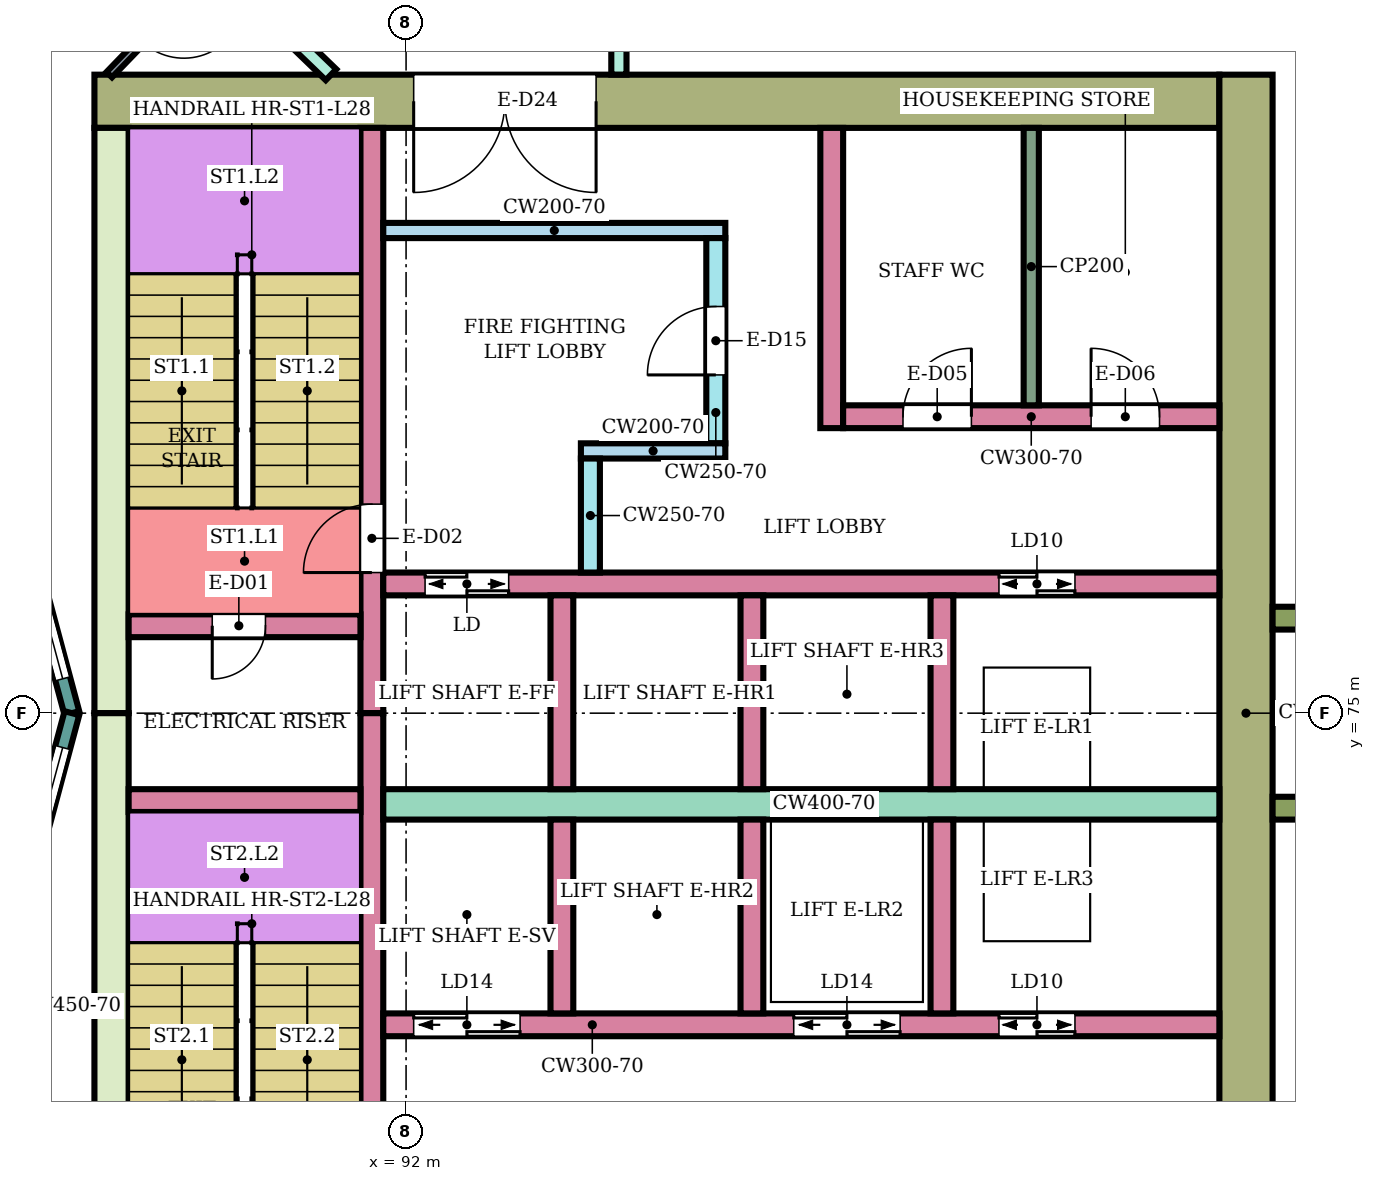
"""IFC4 building model, lengths in metres.
Left out: names, types, materials, properties, quantities, classifications, styles, units other than length and angle.
Written with IfcOpenShell. Run it as: python <this file> out.ifc"""

import sys

from ifc_helpers import new_model, si_unit, direction, frame, frame_2d, origin, place, context, subcontext, project, spatial, rectangle, extrude, element, fill, save


model = new_model("IFC4")
c1 = context("Model", 3, precision=1e-05, world=origin(), true_north=direction((0.0, 1.0)))
c2 = subcontext(c1, "Body", "Model", "MODEL_VIEW")
j1 = project(units=[si_unit("LENGTHUNIT", "METRE"), si_unit("PLANEANGLEUNIT", "RADIAN")], contexts=[c1])
p1 = place(None, origin())
s1 = spatial("IfcSite", under=j1, at=p1, CompositionType="ELEMENT")
p2 = place(p1, origin())
s2 = spatial("IfcBuilding", under=s1, at=p2, CompositionType="ELEMENT")
p3 = place(p2, frame((0.0, 0.0, 122.4)))
s3 = spatial("IfcBuildingStorey", under=s2, at=p3, CompositionType="ELEMENT", Elevation=122.4)
p4 = place(p3, frame((87.9, 83.05, 0.0), z_axis=(0.0, 0.0, 1.0), x_axis=(1.0, 0.0, 0.0)))
e1 = element("IfcWall", 1, at=p4, inside=s3, PredefinedType="SHEAR", context=c2, shape_type="SweptSolid", body=[
    extrude(rectangle(XDim=14.8, YDim=0.7, at=frame_2d((7.4, 0.0))), origin(), (0.0, 0.0, 1.0), 3.58),
])
p5 = place(p4, frame((4.2, 0.0, 0.0)))
e2 = element("IfcOpeningElement", 2, at=p5, cuts=e1, PredefinedType="OPENING", context=c2, shape_type="SweptSolid", body=[
    extrude(rectangle(XDim=2.4, YDim=2.4, at=frame_2d((1.2, 1.2))), frame((0.0, 0.36, 0.0), z_axis=(0.0, -1.0, 0.0), x_axis=(1.0, 0.0, 0.0)), (0.0, 0.0, 1.0), 0.72),
])
for number, where, z_axis, x_axis in (
    (3, (88.125, 75.0, 0.0), (0.0, 0.0, 1.0), (0.0, 1.0, 0.0)),
    (4, (88.125, 67.3, 0.0), (0.0, 0.0, 1.0), (0.0, 1.0, 0.0)),
):
    element("IfcWall", number, at=place(p3, frame(where, z_axis=z_axis, x_axis=x_axis)), inside=s3, PredefinedType="SHEAR", context=c2, shape_type="SweptSolid", body=[
        extrude(rectangle(XDim=7.7, YDim=0.45, at=frame_2d((3.85, 0.0))), origin(), (0.0, 0.0, 1.0), 3.58),
    ])
p6 = place(p3, frame((103.05, 66.6, 0.0), z_axis=(0.0, 0.0, 1.0), x_axis=(0.0, 1.0, 0.0)))
e5 = element("IfcWall", 5, at=p6, inside=s3, PredefinedType="SHEAR", context=c2, shape_type="SweptSolid", body=[
    extrude(rectangle(XDim=16.8, YDim=0.7, at=frame_2d((8.4, 0.0))), origin(), (0.0, 0.0, 1.0), 3.58),
])
p7 = place(p3, frame((91.55, 75.0, 0.0), z_axis=(0.0, 0.0, 1.0), x_axis=(0.0, 1.0, 0.0)))
e6 = element("IfcWall", 6, at=p7, inside=s3, PredefinedType="SHEAR", context=c2, shape_type="SweptSolid", body=[
    extrude(rectangle(XDim=7.7, YDim=0.3, at=frame_2d((3.85, 0.0))), origin(), (0.0, 0.0, 1.0), 3.58),
])
p8 = place(p7, frame((1.85, 0.0, 0.0)))
e7 = element("IfcOpeningElement", 7, at=p8, cuts=e6, PredefinedType="OPENING", context=c2, shape_type="SweptSolid", body=[
    extrude(rectangle(XDim=0.9, YDim=2.1, at=frame_2d((0.45, 1.05))), frame((0.0, 0.16, 0.0), z_axis=(0.0, -1.0, 0.0), x_axis=(1.0, 0.0, 0.0)), (0.0, 0.0, 1.0), 0.32),
])
p9 = place(p3, frame((91.55, 67.3, 0.0), z_axis=(0.0, 0.0, 1.0), x_axis=(0.0, 1.0, 0.0)))
e8 = element("IfcWall", 8, at=p9, inside=s3, PredefinedType="SHEAR", context=c2, shape_type="SweptSolid", body=[
    extrude(rectangle(XDim=7.7, YDim=0.3, at=frame_2d((3.85, 0.0))), origin(), (0.0, 0.0, 1.0), 3.58),
])
p10 = place(p9, frame((0.35, 0.0, 0.0)))
e9 = element("IfcOpeningElement", 9, at=p10, cuts=e8, PredefinedType="OPENING", context=c2, shape_type="SweptSolid", body=[
    extrude(rectangle(XDim=0.9, YDim=2.1, at=frame_2d((0.45, 1.05))), frame((0.0, 0.16, 0.0), z_axis=(0.0, -1.0, 0.0), x_axis=(1.0, 0.0, 0.0)), (0.0, 0.0, 1.0), 0.32),
])
p11 = place(p3, frame((88.35, 76.15, 0.0), z_axis=(0.0, 0.0, 1.0), x_axis=(1.0, 0.0, 0.0)))
e10 = element("IfcWall", 10, at=p11, inside=s3, PredefinedType="SHEAR", context=c2, shape_type="SweptSolid", body=[
    extrude(rectangle(XDim=3.05, YDim=0.3, at=frame_2d((1.525, 0.0))), origin(), (0.0, 0.0, 1.0), 3.58),
])
p12 = place(p11, frame((1.1, 0.0, 0.0)))
e11 = element("IfcOpeningElement", 11, at=p12, cuts=e10, PredefinedType="OPENING", context=c2, shape_type="SweptSolid", body=[
    extrude(rectangle(XDim=0.7, YDim=2.0, at=frame_2d((0.35, 1.0))), frame((0.0, 0.16, 0.0), z_axis=(0.0, -1.0, 0.0), x_axis=(1.0, 0.0, 0.0)), (0.0, 0.0, 1.0), 0.32),
])
p13 = place(p3, frame((88.35, 73.85, 0.0), z_axis=(0.0, 0.0, 1.0), x_axis=(1.0, 0.0, 0.0)))
e12 = element("IfcWall", 12, at=p13, inside=s3, PredefinedType="SHEAR", context=c2, shape_type="SweptSolid", body=[
    extrude(rectangle(XDim=3.05, YDim=0.3, at=frame_2d((1.525, 0.0))), origin(), (0.0, 0.0, 1.0), 3.58),
])
p14 = place(p3, frame((91.7, 76.7, 0.0), z_axis=(0.0, 0.0, 1.0), x_axis=(1.0, 0.0, 0.0)))
e13 = element("IfcWall", 13, at=p14, inside=s3, PredefinedType="SHEAR", context=c2, shape_type="SweptSolid", body=[
    extrude(rectangle(XDim=11.0, YDim=0.3, at=frame_2d((5.5, 0.0))), origin(), (0.0, 0.0, 1.0), 3.58),
])
p15 = place(p14, frame((0.55, 0.0, 0.0)))
e14 = element("IfcOpeningElement", 14, at=p15, cuts=e13, PredefinedType="OPENING", context=c2, shape_type="SweptSolid", body=[
    extrude(rectangle(XDim=1.1, YDim=2.1, at=frame_2d((0.55, 1.05))), frame((0.0, 0.16, 0.0), z_axis=(0.0, -1.0, 0.0), x_axis=(1.0, 0.0, 0.0)), (0.0, 0.0, 1.0), 0.32),
])
p16 = place(p14, frame((8.1, 0.0, 0.0)))
e15 = element("IfcOpeningElement", 15, at=p16, cuts=e13, PredefinedType="OPENING", context=c2, shape_type="SweptSolid", body=[
    extrude(rectangle(XDim=1.0, YDim=2.1, at=frame_2d((0.5, 1.05))), frame((0.0, 0.16, 0.0), z_axis=(0.0, -1.0, 0.0), x_axis=(1.0, 0.0, 0.0)), (0.0, 0.0, 1.0), 0.32),
])
p17 = place(p3, frame((91.7, 73.8, 0.0), z_axis=(0.0, 0.0, 1.0), x_axis=(1.0, 0.0, 0.0)))
e16 = element("IfcWall", 16, at=p17, inside=s3, PredefinedType="SHEAR", context=c2, shape_type="SweptSolid", body=[
    extrude(rectangle(XDim=11.0, YDim=0.4, at=frame_2d((5.5, 0.0))), origin(), (0.0, 0.0, 1.0), 3.58),
])
p18 = place(p3, frame((91.7, 70.9, 0.0), z_axis=(0.0, 0.0, 1.0), x_axis=(1.0, 0.0, 0.0)))
e17 = element("IfcWall", 17, at=p18, inside=s3, PredefinedType="SHEAR", context=c2, shape_type="SweptSolid", body=[
    extrude(rectangle(XDim=11.0, YDim=0.3, at=frame_2d((5.5, 0.0))), origin(), (0.0, 0.0, 1.0), 3.58),
])
p19 = place(p18, frame((0.4, 0.0, 0.0)))
e18 = element("IfcOpeningElement", 18, at=p19, cuts=e17, PredefinedType="OPENING", context=c2, shape_type="SweptSolid", body=[
    extrude(rectangle(XDim=1.4, YDim=2.1, at=frame_2d((0.7, 1.05))), frame((0.0, 0.16, 0.0), z_axis=(0.0, -1.0, 0.0), x_axis=(1.0, 0.0, 0.0)), (0.0, 0.0, 1.0), 0.32),
])
p20 = place(p18, frame((5.4, 0.0, 0.0)))
e19 = element("IfcOpeningElement", 19, at=p20, cuts=e17, PredefinedType="OPENING", context=c2, shape_type="SweptSolid", body=[
    extrude(rectangle(XDim=1.4, YDim=2.1, at=frame_2d((0.7, 1.05))), frame((0.0, 0.16, 0.0), z_axis=(0.0, -1.0, 0.0), x_axis=(1.0, 0.0, 0.0)), (0.0, 0.0, 1.0), 0.32),
])
p21 = place(p18, frame((8.1, 0.0, 0.0)))
e20 = element("IfcOpeningElement", 20, at=p21, cuts=e17, PredefinedType="OPENING", context=c2, shape_type="SweptSolid", body=[
    extrude(rectangle(XDim=1.0, YDim=2.1, at=frame_2d((0.5, 1.05))), frame((0.0, 0.16, 0.0), z_axis=(0.0, -1.0, 0.0), x_axis=(1.0, 0.0, 0.0)), (0.0, 0.0, 1.0), 0.32),
])
for number, where, z_axis, x_axis in (
    (21, (94.05, 74.0, 0.0), (0.0, 0.0, 1.0), (0.0, 1.0, 0.0)),
    (22, (96.55, 74.0, 0.0), (0.0, 0.0, 1.0), (0.0, 1.0, 0.0)),
    (23, (99.05, 74.0, 0.0), (0.0, 0.0, 1.0), (0.0, 1.0, 0.0)),
    (24, (94.05, 71.05, 0.0), (0.0, 0.0, 1.0), (0.0, 1.0, 0.0)),
    (25, (96.55, 71.05, 0.0), (0.0, 0.0, 1.0), (0.0, 1.0, 0.0)),
    (26, (99.05, 71.05, 0.0), (0.0, 0.0, 1.0), (0.0, 1.0, 0.0)),
):
    element("IfcWall", number, at=place(p3, frame(where, z_axis=z_axis, x_axis=x_axis)), inside=s3, PredefinedType="SHEAR", context=c2, shape_type="SweptSolid", body=[
        extrude(rectangle(XDim=2.55, YDim=0.3, at=frame_2d((1.275, 0.0))), origin(), (0.0, 0.0, 1.0), 3.58),
    ])
p22 = place(p3, frame((91.7, 81.35, 0.0), z_axis=(0.0, 0.0, 1.0), x_axis=(1.0, 0.0, 0.0)))
e27 = element("IfcWall", 27, at=p22, inside=s3, PredefinedType="SHEAR", context=c2, shape_type="SweptSolid", body=[
    extrude(rectangle(XDim=4.5, YDim=0.2, at=frame_2d((2.25, 0.0))), origin(), (0.0, 0.0, 1.0), 3.58),
])
p23 = place(p3, frame((96.075, 78.55, 0.0), z_axis=(0.0, 0.0, 1.0), x_axis=(0.0, 1.0, 0.0)))
e28 = element("IfcWall", 28, at=p23, inside=s3, PredefinedType="SHEAR", context=c2, shape_type="SweptSolid", body=[
    extrude(rectangle(XDim=2.7, YDim=0.25, at=frame_2d((1.35, 0.0))), origin(), (0.0, 0.0, 1.0), 3.58),
])
p24 = place(p23, frame((0.9, 0.0, 0.0)))
e29 = element("IfcOpeningElement", 29, at=p24, cuts=e28, PredefinedType="OPENING", context=c2, shape_type="SweptSolid", body=[
    extrude(rectangle(XDim=0.9, YDim=2.1, at=frame_2d((0.45, 1.05))), frame((0.0, 0.135, 0.0), z_axis=(0.0, -1.0, 0.0), x_axis=(1.0, 0.0, 0.0)), (0.0, 0.0, 1.0), 0.27),
])
p25 = place(p3, frame((94.3, 78.45, 0.0), z_axis=(0.0, 0.0, 1.0), x_axis=(1.0, 0.0, 0.0)))
e30 = element("IfcWall", 30, at=p25, inside=s3, PredefinedType="SHEAR", context=c2, shape_type="SweptSolid", body=[
    extrude(rectangle(XDim=1.9, YDim=0.2, at=frame_2d((0.95, 0.0))), origin(), (0.0, 0.0, 1.0), 3.58),
])
p26 = place(p3, frame((94.425, 76.85, 0.0), z_axis=(0.0, 0.0, 1.0), x_axis=(0.0, 1.0, 0.0)))
e31 = element("IfcWall", 31, at=p26, inside=s3, PredefinedType="SHEAR", context=c2, shape_type="SweptSolid", body=[
    extrude(rectangle(XDim=1.5, YDim=0.25, at=frame_2d((0.75, 0.0))), origin(), (0.0, 0.0, 1.0), 3.58),
])
p27 = place(p3, frame((97.6, 78.75, 0.0), z_axis=(0.0, 0.0, 1.0), x_axis=(0.0, 1.0, 0.0)))
e32 = element("IfcWall", 32, at=p27, inside=s3, PredefinedType="SHEAR", context=c2, shape_type="SweptSolid", body=[
    extrude(rectangle(XDim=3.95, YDim=0.3, at=frame_2d((1.975, 0.0))), origin(), (0.0, 0.0, 1.0), 3.58),
])
p28 = place(p3, frame((97.75, 78.9, 0.0), z_axis=(0.0, 0.0, 1.0), x_axis=(1.0, 0.0, 0.0)))
e33 = element("IfcWall", 33, at=p28, inside=s3, PredefinedType="SHEAR", context=c2, shape_type="SweptSolid", body=[
    extrude(rectangle(XDim=4.95, YDim=0.3, at=frame_2d((2.475, 0.0))), origin(), (0.0, 0.0, 1.0), 3.58),
])
p29 = place(p28, frame((0.788, 0.0, 0.0)))
e34 = element("IfcOpeningElement", 34, at=p29, cuts=e33, PredefinedType="OPENING", context=c2, shape_type="SweptSolid", body=[
    extrude(rectangle(XDim=0.9, YDim=2.1, at=frame_2d((0.45, 1.05))), frame((0.0, 0.16, 0.0), z_axis=(0.0, -1.0, 0.0), x_axis=(1.0, 0.0, 0.0)), (0.0, 0.0, 1.0), 0.32),
])
p30 = place(p28, frame((3.262, 0.0, 0.0)))
e35 = element("IfcOpeningElement", 35, at=p30, cuts=e33, PredefinedType="OPENING", context=c2, shape_type="SweptSolid", body=[
    extrude(rectangle(XDim=0.9, YDim=2.1, at=frame_2d((0.45, 1.05))), frame((0.0, 0.16, 0.0), z_axis=(0.0, -1.0, 0.0), x_axis=(1.0, 0.0, 0.0)), (0.0, 0.0, 1.0), 0.32),
])
for number, where, z_axis, x_axis in (
    (36, (103.4, 73.75, 0.0), (0.0, 0.0, 1.0), (1.0, 0.0, 0.0)),
    (37, (103.4, 76.25, 0.0), (0.0, 0.0, 1.0), (1.0, 0.0, 0.0)),
):
    element("IfcWall", number, at=place(p3, frame(where, z_axis=z_axis, x_axis=x_axis)), inside=s3, PredefinedType="NOTDEFINED", context=c2, shape_type="SweptSolid", body=[
        extrude(rectangle(XDim=2.416, YDim=0.3, at=frame_2d((1.208, 0.0))), origin(), (0.0, 0.0, 1.0), 3.9),
    ])
p31 = place(p3, frame((87.604, 75.0, 0.0), z_axis=(0.0, 0.0, 1.0), x_axis=(-0.258789828301, 0.965933654434, 0.0)))
e38 = element("IfcWall", 38, at=p31, inside=s3, PredefinedType="NOTDEFINED", context=c2, shape_type="SweptSolid", body=[
    extrude(rectangle(XDim=3.936, YDim=0.2, at=frame_2d((1.968, 0.0))), origin(), (0.0, 0.0, 1.0), 3.9),
])
p32 = place(p31, frame((0.468, 0.0, 0.9)))
e39 = element("IfcOpeningElement", 39, at=p32, cuts=e38, PredefinedType="OPENING", context=c2, shape_type="SweptSolid", body=[
    extrude(rectangle(XDim=3.0, YDim=2.3, at=frame_2d((1.5, 1.15))), frame((0.0, 0.11, 0.0), z_axis=(0.0, -1.0, 0.0), x_axis=(1.0, 0.0, 0.0)), (0.0, 0.0, 1.0), 0.22),
])
p33 = place(p3, frame((86.585, 71.198, 0.0), z_axis=(0.0, 0.0, 1.0), x_axis=(0.258789828301, 0.965933654434, 0.0)))
e40 = element("IfcWall", 40, at=p33, inside=s3, PredefinedType="NOTDEFINED", context=c2, shape_type="SweptSolid", body=[
    extrude(rectangle(XDim=3.936, YDim=0.2, at=frame_2d((1.968, 0.0))), origin(), (0.0, 0.0, 1.0), 3.9),
])
p34 = place(p33, frame((0.468, 0.0, 0.9)))
e41 = element("IfcOpeningElement", 41, at=p34, cuts=e40, PredefinedType="OPENING", context=c2, shape_type="SweptSolid", body=[
    extrude(rectangle(XDim=3.0, YDim=2.3, at=frame_2d((1.5, 1.15))), frame((0.0, 0.11, 0.0), z_axis=(0.0, -1.0, 0.0), x_axis=(1.0, 0.0, 0.0)), (0.0, 0.0, 1.0), 0.22),
])
p35 = place(p3, frame((87.064, 87.211, 0.0), z_axis=(0.0, 0.0, 1.0), x_axis=(0.719540958932, -0.694450004262, 0.0)))
e42 = element("IfcWall", 42, at=p35, inside=s3, PredefinedType="PARTITIONING", context=c2, shape_type="SweptSolid", body=[
    extrude(rectangle(XDim=5.488, YDim=0.2, at=frame_2d((2.744, 0.0))), origin(), (0.0, 0.0, 1.0), 3.45),
])
p36 = place(p35, frame((0.55, 0.0, 0.0)))
e43 = element("IfcOpeningElement", 43, at=p36, cuts=e42, PredefinedType="OPENING", context=c2, shape_type="SweptSolid", body=[
    extrude(rectangle(XDim=1.0, YDim=2.1, at=frame_2d((0.5, 1.05))), frame((0.0, 0.11, 0.0), z_axis=(0.0, -1.0, 0.0), x_axis=(1.0, 0.0, 0.0)), (0.0, 0.0, 1.0), 0.22),
])
p37 = place(p3, frame((94.8, 83.401, 0.0), z_axis=(0.0, 0.0, 1.0), x_axis=(0.0, 1.0, 0.0)))
e44 = element("IfcWall", 44, at=p37, inside=s3, PredefinedType="PARTITIONING", context=c2, shape_type="SweptSolid", body=[
    extrude(rectangle(XDim=1.499, YDim=0.2, at=frame_2d((0.75, 0.0))), origin(), (0.0, 0.0, 1.0), 3.45),
])
p38 = place(p3, frame((88.095, 83.4, 0.0), z_axis=(0.0, 0.0, 1.0), x_axis=(0.694447472534, 0.719543402368, 0.0)))
e45 = element("IfcWall", 45, at=p38, inside=s3, PredefinedType="PARTITIONING", context=c2, shape_type="SweptSolid", body=[
    extrude(rectangle(XDim=1.926, YDim=0.1, at=frame_2d((0.963, 0.0))), origin(), (0.0, 0.0, 1.0), 3.45),
])
p39 = place(p38, frame((0.613, 0.0, 0.0)))
e46 = element("IfcOpeningElement", 46, at=p39, cuts=e45, PredefinedType="OPENING", context=c2, shape_type="SweptSolid", body=[
    extrude(rectangle(XDim=0.8, YDim=2.1, at=frame_2d((0.4, 1.05))), frame((0.0, 0.06, 0.0), z_axis=(0.0, -1.0, 0.0), x_axis=(1.0, 0.0, 0.0)), (0.0, 0.0, 1.0), 0.12),
])
p40 = place(p3, frame((100.225, 79.05, 0.0), z_axis=(0.0, 0.0, 1.0), x_axis=(0.0, 1.0, 0.0)))
e47 = element("IfcWall", 47, at=p40, inside=s3, PredefinedType="PARTITIONING", context=c2, shape_type="SweptSolid", body=[
    extrude(rectangle(XDim=3.65, YDim=0.2, at=frame_2d((1.825, 0.0))), origin(), (0.0, 0.0, 1.0), 3.58),
])
p41 = place(p32, origin())
e48 = element("IfcWindow", 48, at=p41, inside=s3, PartitioningType="SINGLE_PANEL", PredefinedType="WINDOW", context=c2, shape_type="SweptSolid", body=[
    extrude(rectangle(XDim=3.0, YDim=2.3, at=frame_2d((1.5, 1.15))), frame((0.0, 0.03, 0.0), z_axis=(0.0, -1.0, 0.0), x_axis=(1.0, 0.0, 0.0)), (0.0, 0.0, 1.0), 0.06),
])
fill(e39, e48)
p42 = place(p34, origin())
e49 = element("IfcWindow", 49, at=p42, inside=s3, PartitioningType="SINGLE_PANEL", PredefinedType="WINDOW", context=c2, shape_type="SweptSolid", body=[
    extrude(rectangle(XDim=3.0, YDim=2.3, at=frame_2d((1.5, 1.15))), frame((0.0, 0.03, 0.0), z_axis=(0.0, -1.0, 0.0), x_axis=(1.0, 0.0, 0.0)), (0.0, 0.0, 1.0), 0.06),
])
fill(e41, e49)
p43 = place(p12, frame((0.7, 0.0, 0.0), z_axis=(0.0, 0.0, 1.0), x_axis=(-1.0, 0.0, 0.0)))
e50 = element("IfcDoor", 50, at=p43, inside=s3, OperationType="SINGLE_SWING_RIGHT", PredefinedType="DOOR", context=c2, shape_type="SweptSolid", body=[
    extrude(rectangle(XDim=0.7, YDim=2.0, at=frame_2d((0.35, 1.0))), frame((0.0, 0.025, 0.0), z_axis=(0.0, -1.0, 0.0), x_axis=(1.0, 0.0, 0.0)), (0.0, 0.0, 1.0), 0.05),
])
fill(e11, e50)
p44 = place(p8, origin())
e51 = element("IfcDoor", 51, at=p44, inside=s3, OperationType="SINGLE_SWING_LEFT", PredefinedType="DOOR", context=c2, shape_type="SweptSolid", body=[
    extrude(rectangle(XDim=0.9, YDim=2.1, at=frame_2d((0.45, 1.05))), frame((0.0, 0.025, 0.0), z_axis=(0.0, -1.0, 0.0), x_axis=(1.0, 0.0, 0.0)), (0.0, 0.0, 1.0), 0.05),
])
fill(e7, e51)
p45 = place(p15, origin())
e52 = element("IfcDoor", 52, at=p45, inside=s3, OperationType="DOUBLE_DOOR_SLIDING", PredefinedType="DOOR", context=c2, shape_type="SweptSolid", body=[
    extrude(rectangle(XDim=1.1, YDim=2.1, at=frame_2d((0.55, 1.05))), frame((0.0, 0.025, 0.0), z_axis=(0.0, -1.0, 0.0), x_axis=(1.0, 0.0, 0.0)), (0.0, 0.0, 1.0), 0.05),
])
fill(e14, e52)
p46 = place(p16, origin())
e53 = element("IfcDoor", 53, at=p46, inside=s3, OperationType="DOUBLE_DOOR_SLIDING", PredefinedType="DOOR", context=c2, shape_type="SweptSolid", body=[
    extrude(rectangle(XDim=1.0, YDim=2.1, at=frame_2d((0.5, 1.05))), frame((0.0, 0.025, 0.0), z_axis=(0.0, -1.0, 0.0), x_axis=(1.0, 0.0, 0.0)), (0.0, 0.0, 1.0), 0.05),
])
fill(e15, e53)
p47 = place(p19, origin())
e54 = element("IfcDoor", 54, at=p47, inside=s3, OperationType="DOUBLE_DOOR_SLIDING", PredefinedType="DOOR", context=c2, shape_type="SweptSolid", body=[
    extrude(rectangle(XDim=1.4, YDim=2.1, at=frame_2d((0.7, 1.05))), frame((0.0, 0.025, 0.0), z_axis=(0.0, -1.0, 0.0), x_axis=(1.0, 0.0, 0.0)), (0.0, 0.0, 1.0), 0.05),
])
fill(e18, e54)
p48 = place(p20, origin())
e55 = element("IfcDoor", 55, at=p48, inside=s3, OperationType="DOUBLE_DOOR_SLIDING", PredefinedType="DOOR", context=c2, shape_type="SweptSolid", body=[
    extrude(rectangle(XDim=1.4, YDim=2.1, at=frame_2d((0.7, 1.05))), frame((0.0, 0.025, 0.0), z_axis=(0.0, -1.0, 0.0), x_axis=(1.0, 0.0, 0.0)), (0.0, 0.0, 1.0), 0.05),
])
fill(e19, e55)
p49 = place(p21, origin())
e56 = element("IfcDoor", 56, at=p49, inside=s3, OperationType="DOUBLE_DOOR_SLIDING", PredefinedType="DOOR", context=c2, shape_type="SweptSolid", body=[
    extrude(rectangle(XDim=1.0, YDim=2.1, at=frame_2d((0.5, 1.05))), frame((0.0, 0.025, 0.0), z_axis=(0.0, -1.0, 0.0), x_axis=(1.0, 0.0, 0.0)), (0.0, 0.0, 1.0), 0.05),
])
fill(e20, e56)
p50 = place(p24, origin())
e57 = element("IfcDoor", 57, at=p50, inside=s3, OperationType="SINGLE_SWING_LEFT", PredefinedType="DOOR", context=c2, shape_type="SweptSolid", body=[
    extrude(rectangle(XDim=0.9, YDim=2.1, at=frame_2d((0.45, 1.05))), frame((0.0, 0.025, 0.0), z_axis=(0.0, -1.0, 0.0), x_axis=(1.0, 0.0, 0.0)), (0.0, 0.0, 1.0), 0.05),
])
fill(e29, e57)
p51 = place(p29, origin())
e58 = element("IfcDoor", 58, at=p51, inside=s3, OperationType="SINGLE_SWING_RIGHT", PredefinedType="DOOR", context=c2, shape_type="SweptSolid", body=[
    extrude(rectangle(XDim=0.9, YDim=2.1, at=frame_2d((0.45, 1.05))), frame((0.0, 0.025, 0.0), z_axis=(0.0, -1.0, 0.0), x_axis=(1.0, 0.0, 0.0)), (0.0, 0.0, 1.0), 0.05),
])
fill(e34, e58)
p52 = place(p30, origin())
e59 = element("IfcDoor", 59, at=p52, inside=s3, OperationType="SINGLE_SWING_LEFT", PredefinedType="DOOR", context=c2, shape_type="SweptSolid", body=[
    extrude(rectangle(XDim=0.9, YDim=2.1, at=frame_2d((0.45, 1.05))), frame((0.0, 0.025, 0.0), z_axis=(0.0, -1.0, 0.0), x_axis=(1.0, 0.0, 0.0)), (0.0, 0.0, 1.0), 0.05),
])
fill(e35, e59)
p53 = place(p5, frame((2.4, 0.0, 0.0), z_axis=(0.0, 0.0, 1.0), x_axis=(-1.0, 0.0, 0.0)))
e60 = element("IfcDoor", 60, at=p53, inside=s3, OperationType="DOUBLE_DOOR_SINGLE_SWING", PredefinedType="DOOR", context=c2, shape_type="SweptSolid", body=[
    extrude(rectangle(XDim=2.4, YDim=2.4, at=frame_2d((1.2, 1.2))), frame((0.0, 0.025, 0.0), z_axis=(0.0, -1.0, 0.0), x_axis=(1.0, 0.0, 0.0)), (0.0, 0.0, 1.0), 0.05),
])
fill(e2, e60)
save(model, sys.argv[1])
